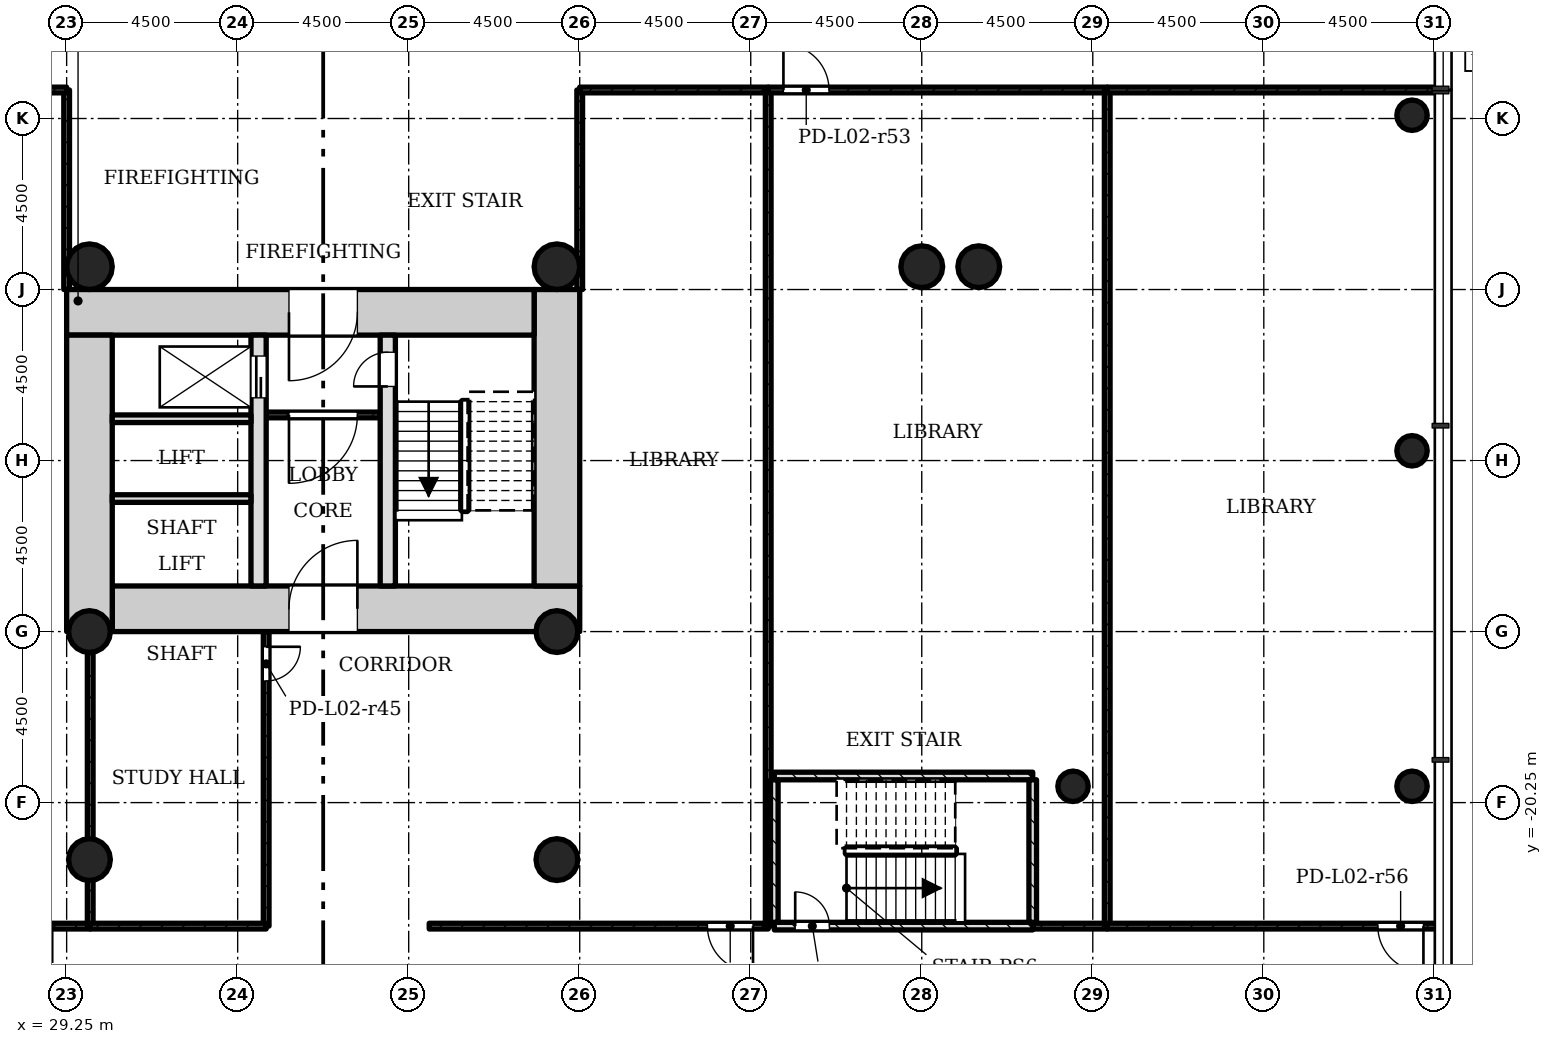
"""IFC4 building model, lengths in metres.
Left out: names, types, materials, properties, quantities, classifications, styles, units other than length and angle.
Written with IfcOpenShell. Run it as: python <this file> out.ifc"""

import sys

from ifc_helpers import new_model, si_unit, direction, frame, frame_2d, origin, origin_2d, place, context, subcontext, project, spatial, rectangle, hollow_circle, extrude, element, fill, save


model = new_model("IFC4")
c1 = context("Model", 3, precision=1e-05, world=origin(), true_north=direction((0.0, 1.0)))
c2 = subcontext(c1, "Body", "Model", "MODEL_VIEW")
j1 = project(units=[si_unit("LENGTHUNIT", "METRE"), si_unit("PLANEANGLEUNIT", "RADIAN")], contexts=[c1])
p1 = place(None, origin())
s1 = spatial("IfcSite", under=j1, at=p1, CompositionType="ELEMENT")
p2 = place(p1, origin())
s2 = spatial("IfcBuilding", under=s1, at=p2, CompositionType="ELEMENT")
p3 = place(p2, frame((0.0, 0.0, 11.0)))
s3 = spatial("IfcBuildingStorey", under=s2, at=p3, CompositionType="ELEMENT", Elevation=11.0)
p4 = place(p3, frame((30.45, -15.15, 0.0), z_axis=(0.0, 0.0, 1.0), x_axis=(1.0, 0.0, 0.0)))
e1 = element("IfcWall", 1, at=p4, inside=s3, PredefinedType="SHEAR", context=c2, shape_type="SweptSolid", body=[
    extrude(rectangle(XDim=12.3, YDim=1.2, at=frame_2d((6.15, 0.0))), origin(), (0.0, 0.0, 1.0), 4.5),
])
p5 = place(p4, frame((4.65, 0.0, 0.0)))
e2 = element("IfcOpeningElement", 2, at=p5, cuts=e1, PredefinedType="OPENING", context=c2, shape_type="SweptSolid", body=[
    extrude(rectangle(XDim=1.8, YDim=2.1, at=frame_2d((0.9, 1.05))), frame((0.0, 0.61, 0.0), z_axis=(0.0, -1.0, 0.0), x_axis=(1.0, 0.0, 0.0)), (0.0, 0.0, 1.0), 1.22),
])
p6 = place(p3, frame((42.15, -14.55, 0.0), z_axis=(0.0, 0.0, 1.0), x_axis=(0.0, 1.0, 0.0)))
e3 = element("IfcWall", 3, at=p6, inside=s3, PredefinedType="SHEAR", context=c2, shape_type="SweptSolid", body=[
    extrude(rectangle(XDim=7.8, YDim=1.2, at=frame_2d((3.9, 0.0))), origin(), (0.0, 0.0, 1.0), 4.5),
])
p7 = place(p3, frame((41.55, -7.35, 0.0), z_axis=(0.0, 0.0, 1.0), x_axis=(-1.0, 0.0, 0.0)))
e4 = element("IfcWall", 4, at=p7, inside=s3, PredefinedType="SHEAR", context=c2, shape_type="SweptSolid", body=[
    extrude(rectangle(XDim=12.3, YDim=1.2, at=frame_2d((6.15, 0.0))), origin(), (0.0, 0.0, 1.0), 4.5),
])
p8 = place(p7, frame((4.65, 0.0, 0.0)))
e5 = element("IfcOpeningElement", 5, at=p8, cuts=e4, PredefinedType="OPENING", context=c2, shape_type="SweptSolid", body=[
    extrude(rectangle(XDim=1.8, YDim=2.1, at=frame_2d((0.9, 1.05))), frame((0.0, 0.61, 0.0), z_axis=(0.0, -1.0, 0.0), x_axis=(1.0, 0.0, 0.0)), (0.0, 0.0, 1.0), 1.22),
])
p9 = place(p3, frame((29.85, -7.95, 0.0), z_axis=(0.0, 0.0, 1.0), x_axis=(0.0, -1.0, 0.0)))
e6 = element("IfcWall", 6, at=p9, inside=s3, PredefinedType="SHEAR", context=c2, shape_type="SweptSolid", body=[
    extrude(rectangle(XDim=7.8, YDim=1.2, at=frame_2d((3.9, 0.0))), origin(), (0.0, 0.0, 1.0), 4.5),
])
p10 = place(p3, frame((34.3, -14.55, 0.0), z_axis=(0.0, 0.0, 1.0), x_axis=(0.0, 1.0, 0.0)))
e7 = element("IfcWall", 7, at=p10, inside=s3, PredefinedType="SHEAR", context=c2, shape_type="SweptSolid", body=[
    extrude(rectangle(XDim=6.6, YDim=0.4, at=frame_2d((3.3, 0.0))), origin(), (0.0, 0.0, 1.0), 4.5),
])
p11 = place(p10, frame((4.95, 0.0, 0.0)))
e8 = element("IfcOpeningElement", 8, at=p11, cuts=e7, PredefinedType="OPENING", context=c2, shape_type="SweptSolid", body=[
    extrude(rectangle(XDim=1.1, YDim=2.1, at=frame_2d((0.55, 1.05))), frame((0.0, 0.21, 0.0), z_axis=(0.0, -1.0, 0.0), x_axis=(1.0, 0.0, 0.0)), (0.0, 0.0, 1.0), 0.42),
])
p12 = place(p3, frame((37.7, -14.55, 0.0), z_axis=(0.0, 0.0, 1.0), x_axis=(0.0, 1.0, 0.0)))
e9 = element("IfcWall", 9, at=p12, inside=s3, PredefinedType="SHEAR", context=c2, shape_type="SweptSolid", body=[
    extrude(rectangle(XDim=6.6, YDim=0.4, at=frame_2d((3.3, 0.0))), origin(), (0.0, 0.0, 1.0), 4.5),
])
p13 = place(p12, frame((5.25, 0.0, 0.0)))
e10 = element("IfcOpeningElement", 10, at=p13, cuts=e9, PredefinedType="OPENING", context=c2, shape_type="SweptSolid", body=[
    extrude(rectangle(XDim=0.9, YDim=2.1, at=frame_2d((0.45, 1.05))), frame((0.0, 0.21, 0.0), z_axis=(0.0, -1.0, 0.0), x_axis=(1.0, 0.0, 0.0)), (0.0, 0.0, 1.0), 0.42),
])
for number, where, z_axis, x_axis in (
    (11, (42.15, -15.75, 0.0), (0.0, 0.0, 1.0), (1.0, 0.0, 0.0)),
    (12, (29.85, -15.75, 0.0), (0.0, 0.0, 1.0), (1.0, 0.0, 0.0)),
    (13, (42.15, -21.75, 0.0), (0.0, 0.0, 1.0), (1.0, 0.0, 0.0)),
    (14, (29.85, -21.75, 0.0), (0.0, 0.0, 1.0), (1.0, 0.0, 0.0)),
    (15, (51.75, -6.15, 0.0), (0.0, 0.0, 1.0), (1.0, 0.0, 0.0)),
    (16, (53.25, -6.15, 0.0), (0.0, 0.0, 1.0), (1.0, 0.0, 0.0)),
):
    element("IfcColumn", number, at=place(p3, frame(where, z_axis=z_axis, x_axis=x_axis)), inside=s3, PredefinedType="COLUMN", context=c2, shape_type="SweptSolid", body=[
        extrude(hollow_circle(Radius=0.55, WallThickness=0.04, at=origin_2d()), origin(), (0.0, 0.0, 1.0), 4.5),
    ])
for number, where, z_axis, x_axis in (
    (17, (42.15, -6.15, 0.0), (0.0, 0.0, 1.0), (1.0, 0.0, 0.0)),
    (18, (29.85, -6.15, 0.0), (0.0, 0.0, 1.0), (1.0, 0.0, 0.0)),
):
    element("IfcColumn", number, at=place(p3, frame(where, z_axis=z_axis, x_axis=x_axis)), inside=s3, PredefinedType="COLUMN", context=c2, shape_type="SweptSolid", body=[
        extrude(hollow_circle(Radius=0.6, WallThickness=0.045, at=origin_2d()), origin(), (0.0, 0.0, 1.0), 4.5),
    ])
for number, where, z_axis, x_axis in (
    (19, (55.73, -19.821, 0.0), (0.0, 0.0, 1.0), (1.0, 0.0, 0.0)),
    (20, (64.65, -19.821, 0.0), (0.0, 0.0, 1.0), (1.0, 0.0, 0.0)),
    (21, (64.65, -10.993, 0.0), (0.0, 0.0, 1.0), (1.0, 0.0, 0.0)),
    (22, (64.65, -2.164, 0.0), (0.0, 0.0, 1.0), (1.0, 0.0, 0.0)),
):
    element("IfcColumn", number, at=place(p3, frame(where, z_axis=z_axis, x_axis=x_axis)), inside=s3, PredefinedType="COLUMN", context=c2, shape_type="SweptSolid", body=[
        extrude(hollow_circle(Radius=0.4, WallThickness=0.028, at=origin_2d()), origin(), (0.0, 0.0, 1.0), 4.5),
    ])
p14 = place(p3, frame((34.5, -10.05, 0.0), z_axis=(0.0, 0.0, 1.0), x_axis=(1.0, 0.0, 0.0)))
e23 = element("IfcWall", 23, at=p14, inside=s3, PredefinedType="PARTITIONING", context=c2, shape_type="SweptSolid", body=[
    extrude(rectangle(XDim=3.0, YDim=0.15, at=frame_2d((1.5, 0.0))), origin(), (0.0, 0.0, 1.0), 4.08),
])
p15 = place(p14, frame((0.6, 0.0, 0.0)))
e24 = element("IfcOpeningElement", 24, at=p15, cuts=e23, PredefinedType="OPENING", context=c2, shape_type="SweptSolid", body=[
    extrude(rectangle(XDim=1.8, YDim=2.1, at=frame_2d((0.9, 1.05))), frame((0.0, 0.085, 0.0), z_axis=(0.0, -1.0, 0.0), x_axis=(1.0, 0.0, 0.0)), (0.0, 0.0, 1.0), 0.17),
])
for number, where, z_axis, x_axis in (
    (25, (30.45, -10.15, 0.0), (0.0, 0.0, 1.0), (1.0, 0.0, 0.0)),
    (26, (30.45, -12.25, 0.0), (0.0, 0.0, 1.0), (1.0, 0.0, 0.0)),
):
    element("IfcWall", number, at=place(p3, frame(where, z_axis=z_axis, x_axis=x_axis)), inside=s3, PredefinedType="SOLIDWALL", context=c2, shape_type="SweptSolid", body=[
        extrude(rectangle(XDim=3.65, YDim=0.2, at=frame_2d((1.825, 0.0))), origin(), (0.0, 0.0, 1.0), 4.08),
    ])
p16 = place(p3, frame((29.25, -1.5, 0.0), z_axis=(0.0, 0.0, 1.0), x_axis=(0.0, -1.0, 0.0)))
e27 = element("IfcWall", 27, at=p16, inside=s3, PredefinedType="PARTITIONING", context=c2, shape_type="SweptSolid", body=[
    extrude(rectangle(XDim=5.25, YDim=0.15, at=frame_2d((2.625, 0.0))), origin(), (0.0, 0.0, 1.0), 4.08),
])
p17 = place(p3, frame((29.87, -23.5, 0.0), z_axis=(0.0, 0.0, 1.0), x_axis=(-1.0, 0.0, 0.0)))
e28 = element("IfcWall", 28, at=p17, inside=s3, PredefinedType="PARTITIONING", context=c2, shape_type="SweptSolid", body=[
    extrude(rectangle(XDim=8.92, YDim=0.15, at=frame_2d((4.46, 0.0))), origin(), (0.0, 0.0, 1.0), 4.08),
])
p18 = place(p17, frame((1.0, 0.0, 0.0)))
e29 = element("IfcOpeningElement", 29, at=p18, cuts=e28, PredefinedType="OPENING", context=c2, shape_type="SweptSolid", body=[
    extrude(rectangle(XDim=1.2, YDim=2.1, at=frame_2d((0.6, 1.05))), frame((0.0, 0.085, 0.0), z_axis=(0.0, -1.0, 0.0), x_axis=(1.0, 0.0, 0.0)), (0.0, 0.0, 1.0), 0.17),
])
p19 = place(p3, frame((20.95, -1.5, 0.0), z_axis=(0.0, 0.0, 1.0), x_axis=(1.0, 0.0, 0.0)))
e30 = element("IfcWall", 30, at=p19, inside=s3, PredefinedType="PARTITIONING", context=c2, shape_type="SweptSolid", body=[
    extrude(rectangle(XDim=8.3, YDim=0.15, at=frame_2d((4.15, 0.0))), origin(), (0.0, 0.0, 1.0), 4.08),
])
p20 = place(p3, frame((29.87, -15.75, 0.0), z_axis=(0.0, 0.0, 1.0), x_axis=(0.0, -1.0, 0.0)))
e31 = element("IfcWall", 31, at=p20, inside=s3, PredefinedType="PARTITIONING", context=c2, shape_type="SweptSolid", body=[
    extrude(rectangle(XDim=7.75, YDim=0.15, at=frame_2d((3.875, 0.0))), origin(), (0.0, 0.0, 1.0), 4.08),
])
p21 = place(p3, frame((34.5, -15.75, 0.0), z_axis=(0.0, 0.0, 1.0), x_axis=(0.0, -1.0, 0.0)))
e32 = element("IfcWall", 32, at=p21, inside=s3, PredefinedType="PARTITIONING", context=c2, shape_type="SweptSolid", body=[
    extrude(rectangle(XDim=7.75, YDim=0.15, at=frame_2d((3.875, 0.0))), origin(), (0.0, 0.0, 1.0), 4.08),
])
p22 = place(p21, frame((0.4, 0.0, 0.0)))
e33 = element("IfcOpeningElement", 33, at=p22, cuts=e32, PredefinedType="OPENING", context=c2, shape_type="SweptSolid", body=[
    extrude(rectangle(XDim=0.9, YDim=2.1, at=frame_2d((0.45, 1.05))), frame((0.0, 0.085, 0.0), z_axis=(0.0, -1.0, 0.0), x_axis=(1.0, 0.0, 0.0)), (0.0, 0.0, 1.0), 0.17),
])
p23 = place(p3, frame((34.5, -23.5, 0.0), z_axis=(0.0, 0.0, 1.0), x_axis=(-1.0, 0.0, 0.0)))
e34 = element("IfcWall", 34, at=p23, inside=s3, PredefinedType="PARTITIONING", context=c2, shape_type="SweptSolid", body=[
    extrude(rectangle(XDim=4.63, YDim=0.15, at=frame_2d((2.315, 0.0))), origin(), (0.0, 0.0, 1.0), 4.08),
])
p24 = place(p3, frame((42.75, -6.75, 0.0), z_axis=(0.0, 0.0, 1.0), x_axis=(0.0, 1.0, 0.0)))
e35 = element("IfcWall", 35, at=p24, inside=s3, PredefinedType="PARTITIONING", context=c2, shape_type="SweptSolid", body=[
    extrude(rectangle(XDim=5.25, YDim=0.15, at=frame_2d((2.625, 0.0))), origin(), (0.0, 0.0, 1.0), 4.08),
])
p25 = place(p3, frame((42.75, -1.5, 0.0), z_axis=(0.0, 0.0, 1.0), x_axis=(1.0, 0.0, 0.0)))
e36 = element("IfcWall", 36, at=p25, inside=s3, PredefinedType="PARTITIONING", context=c2, shape_type="SweptSolid", body=[
    extrude(rectangle(XDim=4.96, YDim=0.15, at=frame_2d((2.48, 0.0))), origin(), (0.0, 0.0, 1.0), 4.08),
])
p26 = place(p3, frame((47.71, -23.5, 0.0), z_axis=(0.0, 0.0, 1.0), x_axis=(-1.0, 0.0, 0.0)))
e37 = element("IfcWall", 37, at=p26, inside=s3, PredefinedType="PARTITIONING", context=c2, shape_type="SweptSolid", body=[
    extrude(rectangle(XDim=8.92, YDim=0.15, at=frame_2d((4.46, 0.0))), origin(), (0.0, 0.0, 1.0), 4.08),
])
p27 = place(p26, frame((0.4, 0.0, 0.0)))
e38 = element("IfcOpeningElement", 38, at=p27, cuts=e37, PredefinedType="OPENING", context=c2, shape_type="SweptSolid", body=[
    extrude(rectangle(XDim=1.2, YDim=2.1, at=frame_2d((0.6, 1.05))), frame((0.0, 0.085, 0.0), z_axis=(0.0, -1.0, 0.0), x_axis=(1.0, 0.0, 0.0)), (0.0, 0.0, 1.0), 0.17),
])
p28 = place(p3, frame((47.71, -1.5, 0.0), z_axis=(0.0, 0.0, 1.0), x_axis=(0.0, -1.0, 0.0)))
e39 = element("IfcWall", 39, at=p28, inside=s3, PredefinedType="PARTITIONING", context=c2, shape_type="SweptSolid", body=[
    extrude(rectangle(XDim=22.0, YDim=0.15, at=frame_2d((11.0, 0.0))), origin(), (0.0, 0.0, 1.0), 4.08),
])
p29 = place(p3, frame((56.63, -23.5, 0.0), z_axis=(0.0, 0.0, 1.0), x_axis=(-1.0, 0.0, 0.0)))
e40 = element("IfcWall", 40, at=p29, inside=s3, PredefinedType="PARTITIONING", context=c2, shape_type="SweptSolid", body=[
    extrude(rectangle(XDim=1.96, YDim=0.15, at=frame_2d((0.98, 0.0))), origin(), (0.0, 0.0, 1.0), 4.08),
])
p30 = place(p3, frame((47.71, -1.5, 0.0), z_axis=(0.0, 0.0, 1.0), x_axis=(1.0, 0.0, 0.0)))
e41 = element("IfcWall", 41, at=p30, inside=s3, PredefinedType="PARTITIONING", context=c2, shape_type="SweptSolid", body=[
    extrude(rectangle(XDim=8.92, YDim=0.15, at=frame_2d((4.46, 0.0))), origin(), (0.0, 0.0, 1.0), 4.08),
])
p31 = place(p30, frame((0.4, 0.0, 0.0)))
e42 = element("IfcOpeningElement", 42, at=p31, cuts=e41, PredefinedType="OPENING", context=c2, shape_type="SweptSolid", body=[
    extrude(rectangle(XDim=1.2, YDim=2.1, at=frame_2d((0.6, 1.05))), frame((0.0, 0.085, 0.0), z_axis=(0.0, -1.0, 0.0), x_axis=(1.0, 0.0, 0.0)), (0.0, 0.0, 1.0), 0.17),
])
p32 = place(p3, frame((56.63, -1.5, 0.0), z_axis=(0.0, 0.0, 1.0), x_axis=(0.0, -1.0, 0.0)))
e43 = element("IfcWall", 43, at=p32, inside=s3, PredefinedType="PARTITIONING", context=c2, shape_type="SweptSolid", body=[
    extrude(rectangle(XDim=22.0, YDim=0.15, at=frame_2d((11.0, 0.0))), origin(), (0.0, 0.0, 1.0), 4.08),
])
p33 = place(p3, frame((65.35, -23.5, 0.0), z_axis=(0.0, 0.0, 1.0), x_axis=(-1.0, 0.0, 0.0)))
e44 = element("IfcWall", 44, at=p33, inside=s3, PredefinedType="PARTITIONING", context=c2, shape_type="SweptSolid", body=[
    extrude(rectangle(XDim=8.72, YDim=0.15, at=frame_2d((4.36, 0.0))), origin(), (0.0, 0.0, 1.0), 4.08),
])
p34 = place(p33, frame((0.4, 0.0, 0.0)))
e45 = element("IfcOpeningElement", 45, at=p34, cuts=e44, PredefinedType="OPENING", context=c2, shape_type="SweptSolid", body=[
    extrude(rectangle(XDim=1.2, YDim=2.1, at=frame_2d((0.6, 1.05))), frame((0.0, 0.085, 0.0), z_axis=(0.0, -1.0, 0.0), x_axis=(1.0, 0.0, 0.0)), (0.0, 0.0, 1.0), 0.17),
])
p35 = place(p3, frame((56.63, -1.5, 0.0), z_axis=(0.0, 0.0, 1.0), x_axis=(1.0, 0.0, 0.0)))
e46 = element("IfcWall", 46, at=p35, inside=s3, PredefinedType="PARTITIONING", context=c2, shape_type="SweptSolid", body=[
    extrude(rectangle(XDim=8.72, YDim=0.15, at=frame_2d((4.36, 0.0))), origin(), (0.0, 0.0, 1.0), 4.08),
])
p36 = place(p3, frame((47.87, -23.5, 0.0), z_axis=(0.0, 0.0, 1.0), x_axis=(1.0, 0.0, 0.0)))
e47 = element("IfcWall", 47, at=p36, inside=s3, PredefinedType="SHEAR", context=c2, shape_type="SweptSolid", body=[
    extrude(rectangle(XDim=6.8, YDim=0.2, at=frame_2d((3.4, 0.0))), origin(), (0.0, 0.0, 1.0), 4.08),
])
p37 = place(p36, frame((0.55, 0.0, 0.0)))
e48 = element("IfcOpeningElement", 48, at=p37, cuts=e47, PredefinedType="OPENING", context=c2, shape_type="SweptSolid", body=[
    extrude(rectangle(XDim=0.9, YDim=2.1, at=frame_2d((0.45, 1.05))), frame((0.0, 0.11, 0.0), z_axis=(0.0, -1.0, 0.0), x_axis=(1.0, 0.0, 0.0)), (0.0, 0.0, 1.0), 0.22),
])
p38 = place(p3, frame((47.87, -19.55, 0.0), z_axis=(0.0, 0.0, 1.0), x_axis=(1.0, 0.0, 0.0)))
e49 = element("IfcWall", 49, at=p38, inside=s3, PredefinedType="SHEAR", context=c2, shape_type="SweptSolid", body=[
    extrude(rectangle(XDim=6.8, YDim=0.2, at=frame_2d((3.4, 0.0))), origin(), (0.0, 0.0, 1.0), 4.08),
])
for number, where, z_axis, x_axis in (
    (50, (47.87, -23.4, 0.0), (0.0, 0.0, 1.0), (0.0, 1.0, 0.0)),
    (51, (54.67, -23.4, 0.0), (0.0, 0.0, 1.0), (0.0, 1.0, 0.0)),
):
    element("IfcWall", number, at=place(p3, frame(where, z_axis=z_axis, x_axis=x_axis)), inside=s3, PredefinedType="SHEAR", context=c2, shape_type="SweptSolid", body=[
        extrude(rectangle(XDim=3.75, YDim=0.2, at=frame_2d((1.875, 0.0))), origin(), (0.0, 0.0, 1.0), 4.08),
    ])
p39 = place(p15, origin())
e52 = element("IfcDoor", 52, at=p39, inside=s3, OperationType="SINGLE_SWING_LEFT", PredefinedType="DOOR", context=c2, shape_type="SweptSolid", body=[
    extrude(rectangle(XDim=1.8, YDim=2.1, at=frame_2d((0.9, 1.05))), frame((0.0, 0.025, 0.0), z_axis=(0.0, -1.0, 0.0), x_axis=(1.0, 0.0, 0.0)), (0.0, 0.0, 1.0), 0.05),
])
fill(e24, e52)
p40 = place(p22, origin())
e53 = element("IfcDoor", 53, at=p40, inside=s3, OperationType="SINGLE_SWING_RIGHT", PredefinedType="DOOR", context=c2, shape_type="SweptSolid", body=[
    extrude(rectangle(XDim=0.9, YDim=2.1, at=frame_2d((0.45, 1.05))), frame((0.0, 0.025, 0.0), z_axis=(0.0, -1.0, 0.0), x_axis=(1.0, 0.0, 0.0)), (0.0, 0.0, 1.0), 0.05),
])
fill(e33, e53)
p41 = place(p27, origin())
e54 = element("IfcDoor", 54, at=p41, inside=s3, OperationType="SINGLE_SWING_RIGHT", PredefinedType="DOOR", context=c2, shape_type="SweptSolid", body=[
    extrude(rectangle(XDim=1.2, YDim=2.1, at=frame_2d((0.6, 1.05))), frame((0.0, 0.025, 0.0), z_axis=(0.0, -1.0, 0.0), x_axis=(1.0, 0.0, 0.0)), (0.0, 0.0, 1.0), 0.05),
])
fill(e38, e54)
p42 = place(p31, origin())
e55 = element("IfcDoor", 55, at=p42, inside=s3, OperationType="SINGLE_SWING_RIGHT", PredefinedType="DOOR", context=c2, shape_type="SweptSolid", body=[
    extrude(rectangle(XDim=1.2, YDim=2.1, at=frame_2d((0.6, 1.05))), frame((0.0, 0.025, 0.0), z_axis=(0.0, -1.0, 0.0), x_axis=(1.0, 0.0, 0.0)), (0.0, 0.0, 1.0), 0.05),
])
fill(e42, e55)
p43 = place(p34, origin())
e56 = element("IfcDoor", 56, at=p43, inside=s3, OperationType="SINGLE_SWING_RIGHT", PredefinedType="DOOR", context=c2, shape_type="SweptSolid", body=[
    extrude(rectangle(XDim=1.2, YDim=2.1, at=frame_2d((0.6, 1.05))), frame((0.0, 0.025, 0.0), z_axis=(0.0, -1.0, 0.0), x_axis=(1.0, 0.0, 0.0)), (0.0, 0.0, 1.0), 0.05),
])
fill(e45, e56)
p44 = place(p37, origin())
e57 = element("IfcDoor", 57, at=p44, inside=s3, OperationType="SINGLE_SWING_RIGHT", PredefinedType="DOOR", context=c2, shape_type="SweptSolid", body=[
    extrude(rectangle(XDim=0.9, YDim=2.1, at=frame_2d((0.45, 1.05))), frame((0.0, 0.025, 0.0), z_axis=(0.0, -1.0, 0.0), x_axis=(1.0, 0.0, 0.0)), (0.0, 0.0, 1.0), 0.05),
])
fill(e48, e57)
p45 = place(p13, origin())
e58 = element("IfcDoor", 58, at=p45, inside=s3, OperationType="SINGLE_SWING_RIGHT", PredefinedType="DOOR", context=c2, shape_type="SweptSolid", body=[
    extrude(rectangle(XDim=0.9, YDim=2.1, at=frame_2d((0.45, 1.05))), frame((0.0, 0.025, 0.0), z_axis=(0.0, -1.0, 0.0), x_axis=(1.0, 0.0, 0.0)), (0.0, 0.0, 1.0), 0.05),
])
fill(e10, e58)
p46 = place(p11, origin())
e59 = element("IfcDoor", 59, at=p46, inside=s3, OperationType="SLIDING_TO_LEFT", PredefinedType="DOOR", context=c2, shape_type="SweptSolid", body=[
    extrude(rectangle(XDim=1.1, YDim=2.1, at=frame_2d((0.55, 1.05))), frame((0.0, 0.025, 0.0), z_axis=(0.0, -1.0, 0.0), x_axis=(1.0, 0.0, 0.0)), (0.0, 0.0, 1.0), 0.05),
])
fill(e8, e59)
p47 = place(p8, origin())
e60 = element("IfcDoor", 60, at=p47, inside=s3, OperationType="SINGLE_SWING_LEFT", PredefinedType="DOOR", context=c2, shape_type="SweptSolid", body=[
    extrude(rectangle(XDim=1.8, YDim=2.1, at=frame_2d((0.9, 1.05))), frame((0.0, 0.025, 0.0), z_axis=(0.0, -1.0, 0.0), x_axis=(1.0, 0.0, 0.0)), (0.0, 0.0, 1.0), 0.05),
])
fill(e5, e60)
p48 = place(p5, origin())
e61 = element("IfcDoor", 61, at=p48, inside=s3, OperationType="SINGLE_SWING_LEFT", PredefinedType="DOOR", context=c2, shape_type="SweptSolid", body=[
    extrude(rectangle(XDim=1.8, YDim=2.1, at=frame_2d((0.9, 1.05))), frame((0.0, 0.025, 0.0), z_axis=(0.0, -1.0, 0.0), x_axis=(1.0, 0.0, 0.0)), (0.0, 0.0, 1.0), 0.05),
])
fill(e2, e61)
save(model, sys.argv[1])
